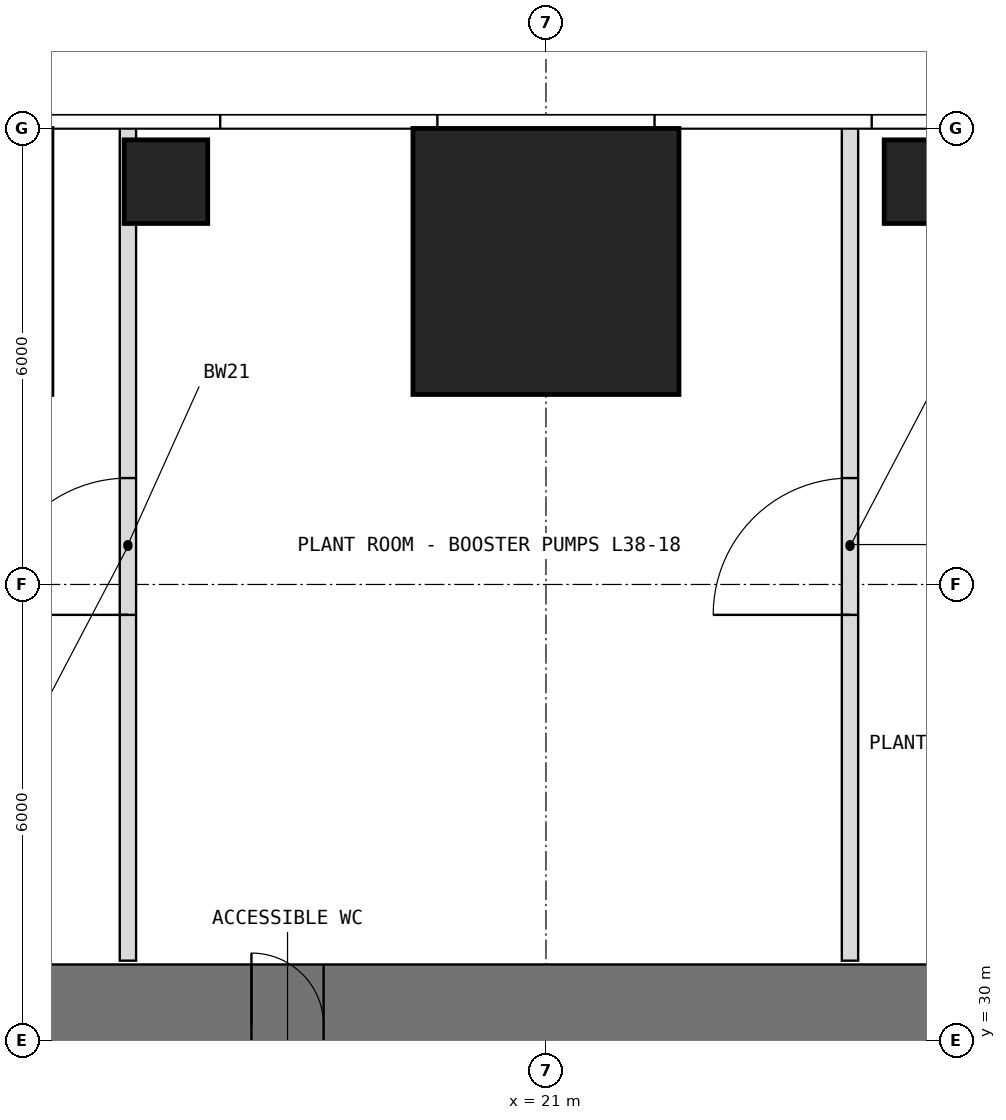
"""IFC4 building model, lengths in metres.
Left out: names, types, materials, properties, quantities, classifications, styles, units other than length and angle.
Written with IfcOpenShell. Run it as: python <this file> out.ifc"""

import sys

from ifc_helpers import new_model, si_unit, direction, frame, frame_2d, origin, origin_2d, place, context, subcontext, project, spatial, rectangle, extrude, element, fill, save


model = new_model("IFC4")
c1 = context("Model", 3, precision=1e-05, world=origin(), true_north=direction((0.0, 1.0)))
c2 = subcontext(c1, "Body", "Model", "MODEL_VIEW")
j1 = project(units=[si_unit("LENGTHUNIT", "METRE"), si_unit("PLANEANGLEUNIT", "RADIAN")], contexts=[c1])
p1 = place(None, origin())
s1 = spatial("IfcSite", under=j1, at=p1, CompositionType="ELEMENT")
p2 = place(p1, origin())
s2 = spatial("IfcBuilding", under=s1, at=p2, CompositionType="ELEMENT")
p3 = place(p2, frame((0.0, 0.0, 160.5)))
s3 = spatial("IfcBuildingStorey", under=s2, at=p3, CompositionType="ELEMENT", Elevation=160.5)
p4 = place(p3, frame((16.0, 41.3, 0.0), z_axis=(0.0, 0.0, 1.0), x_axis=(1.0, 0.0, 0.0)))
e1 = element("IfcColumn", 1, at=p4, inside=s3, PredefinedType="COLUMN", context=c2, shape_type="SweptSolid", body=[
    extrude(rectangle(XDim=1.1, YDim=1.1, at=origin_2d()), origin(), (0.0, 0.0, 1.0), 5.0),
])
p5 = place(p3, frame((21.0, 40.25, 0.0), z_axis=(0.0, 0.0, 1.0), x_axis=(1.0, 0.0, 0.0)))
e2 = element("IfcColumn", 2, at=p5, inside=s3, PredefinedType="COLUMN", context=c2, shape_type="SweptSolid", body=[
    extrude(rectangle(XDim=3.5, YDim=3.5, at=origin_2d()), origin(), (0.0, 0.0, 1.0), 5.0),
])
p6 = place(p3, frame((26.0, 41.3, 0.0), z_axis=(0.0, 0.0, 1.0), x_axis=(1.0, 0.0, 0.0)))
e3 = element("IfcColumn", 3, at=p6, inside=s3, PredefinedType="COLUMN", context=c2, shape_type="SweptSolid", body=[
    extrude(rectangle(XDim=1.1, YDim=1.1, at=origin_2d()), origin(), (0.0, 0.0, 1.0), 5.0),
])
p7 = place(p3, frame((11.0, 30.2, -0.25), z_axis=(0.0, 0.0, 1.0), x_axis=(1.0, 0.0, 0.0)))
e4 = element("IfcWall", 4, at=p7, inside=s3, PredefinedType="SHEAR", context=c2, shape_type="SweptSolid", body=[
    extrude(rectangle(XDim=20.0, YDim=1.6, at=frame_2d((10.0, 0.0))), origin(), (0.0, 0.0, 1.0), 5.2),
])
p8 = place(p7, frame((6.125, 0.0, 0.25)))
e5 = element("IfcOpeningElement", 5, at=p8, cuts=e4, PredefinedType="OPENING", context=c2, shape_type="SweptSolid", body=[
    extrude(rectangle(XDim=0.95, YDim=2.4, at=frame_2d((0.475, 1.2))), frame((0.0, 0.81, 0.0), z_axis=(0.0, -1.0, 0.0), x_axis=(1.0, 0.0, 0.0)), (0.0, 0.0, 1.0), 1.62),
])
p9 = place(p3, frame((15.5, 31.05, 0.0), z_axis=(0.0, 0.0, 1.0), x_axis=(0.0, 1.0, 0.0)))
e6 = element("IfcWall", 6, at=p9, inside=s3, PredefinedType="PARTITIONING", context=c2, shape_type="SweptSolid", body=[
    extrude(rectangle(XDim=10.95, YDim=0.215, at=frame_2d((5.475, 0.0))), origin(), (0.0, 0.0, 1.0), 4.75),
])
p10 = place(p9, frame((4.55, 0.0, 0.0)))
e7 = element("IfcOpeningElement", 7, at=p10, cuts=e6, PredefinedType="OPENING", context=c2, shape_type="SweptSolid", body=[
    extrude(rectangle(XDim=1.8, YDim=2.4, at=frame_2d((0.9, 1.2))), frame((0.0, 0.118, 0.0), z_axis=(0.0, -1.0, 0.0), x_axis=(1.0, 0.0, 0.0)), (0.0, 0.0, 1.0), 0.235),
])
p11 = place(p3, frame((25.0, 31.05, 0.0), z_axis=(0.0, 0.0, 1.0), x_axis=(0.0, 1.0, 0.0)))
e8 = element("IfcWall", 8, at=p11, inside=s3, PredefinedType="PARTITIONING", context=c2, shape_type="SweptSolid", body=[
    extrude(rectangle(XDim=10.95, YDim=0.215, at=frame_2d((5.475, 0.0))), origin(), (0.0, 0.0, 1.0), 4.75),
])
p12 = place(p11, frame((4.55, 0.0, 0.0)))
e9 = element("IfcOpeningElement", 9, at=p12, cuts=e8, PredefinedType="OPENING", context=c2, shape_type="SweptSolid", body=[
    extrude(rectangle(XDim=1.8, YDim=2.4, at=frame_2d((0.9, 1.2))), frame((0.0, 0.118, 0.0), z_axis=(0.0, -1.0, 0.0), x_axis=(1.0, 0.0, 0.0)), (0.0, 0.0, 1.0), 0.235),
])
p13 = place(p8, origin())
e10 = element("IfcDoor", 10, at=p13, inside=s3, OperationType="SINGLE_SWING_LEFT", PredefinedType="DOOR", context=c2, shape_type="SweptSolid", body=[
    extrude(rectangle(XDim=0.95, YDim=2.4, at=frame_2d((0.475, 1.2))), frame((0.0, 0.125, 0.0), z_axis=(0.0, -1.0, 0.0), x_axis=(1.0, 0.0, 0.0)), (0.0, 0.0, 1.0), 0.05),
])
fill(e5, e10)
p14 = place(p10, origin())
e11 = element("IfcDoor", 11, at=p14, inside=s3, OperationType="DOUBLE_DOOR_SINGLE_SWING", PredefinedType="DOOR", context=c2, shape_type="SweptSolid", body=[
    extrude(rectangle(XDim=1.8, YDim=2.4, at=frame_2d((0.9, 1.2))), frame((0.0, 0.025, 0.0), z_axis=(0.0, -1.0, 0.0), x_axis=(1.0, 0.0, 0.0)), (0.0, 0.0, 1.0), 0.05),
])
fill(e7, e11)
p15 = place(p12, origin())
e12 = element("IfcDoor", 12, at=p15, inside=s3, OperationType="DOUBLE_DOOR_SINGLE_SWING", PredefinedType="DOOR", context=c2, shape_type="SweptSolid", body=[
    extrude(rectangle(XDim=1.8, YDim=2.4, at=frame_2d((0.9, 1.2))), frame((0.0, 0.025, 0.0), z_axis=(0.0, -1.0, 0.0), x_axis=(1.0, 0.0, 0.0)), (0.0, 0.0, 1.0), 0.05),
])
fill(e9, e12)
save(model, sys.argv[1])
